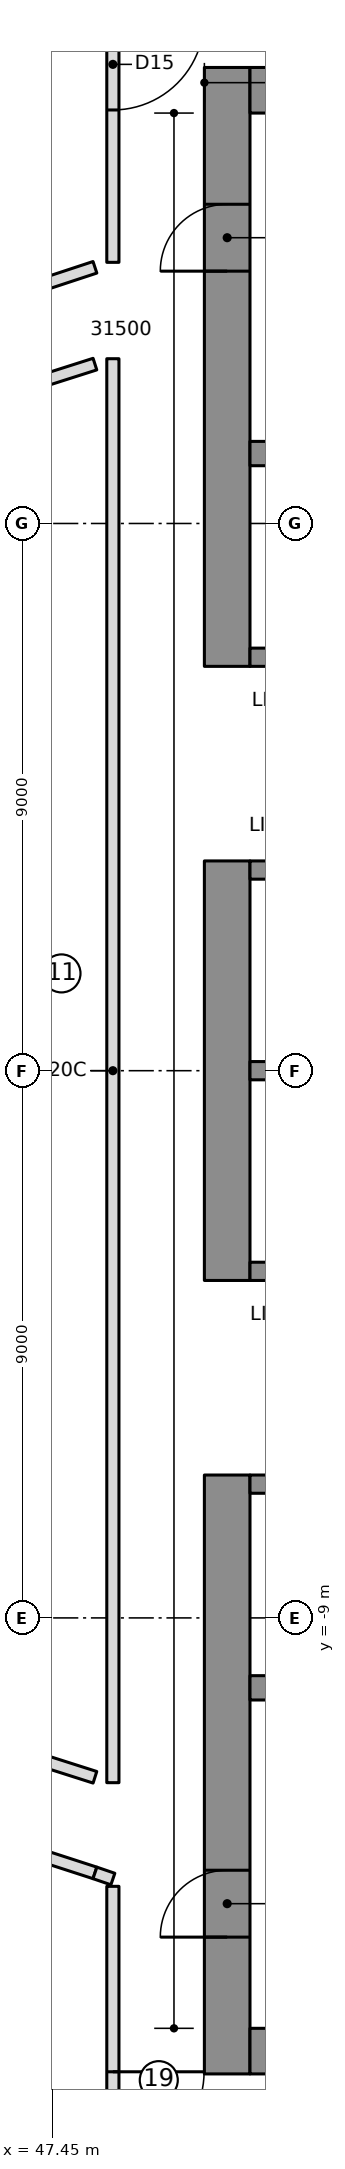
"""IFC4 building model, lengths in metres.
Left out: names, types, materials, properties, quantities, classifications, styles, units other than length and angle.
Written with IfcOpenShell. Run it as: python <this file> out.ifc"""

import sys

from ifc_helpers import new_model, si_unit, direction, frame, frame_2d, origin, place, context, subcontext, project, spatial, rectangle, extrude, element, fill, save


model = new_model("IFC4")
c1 = context("Model", 3, precision=1e-05, world=origin(), true_north=direction((0.0, 1.0)))
c2 = subcontext(c1, "Body", "Model", "MODEL_VIEW")
j1 = project(units=[si_unit("LENGTHUNIT", "METRE"), si_unit("PLANEANGLEUNIT", "RADIAN")], contexts=[c1])
p1 = place(None, origin())
s1 = spatial("IfcSite", under=j1, at=p1, CompositionType="ELEMENT")
p2 = place(p1, origin())
s2 = spatial("IfcBuilding", under=s1, at=p2, CompositionType="ELEMENT")
p3 = place(p2, frame((0.0, 0.0, 189.7)))
s3 = spatial("IfcBuildingStorey", under=s2, at=p3, CompositionType="ELEMENT", Elevation=189.7)
p4 = place(p3, frame((50.325, 6.65, 0.0), z_axis=(0.0, 0.0, 1.0), x_axis=(0.0, 1.0, 0.0)))
e1 = element("IfcWall", 1, at=p4, inside=s3, PredefinedType="SHEAR", context=c2, shape_type="SweptSolid", body=[
    extrude(rectangle(XDim=9.85, YDim=0.75, at=frame_2d((4.925, 0.0))), origin(), (0.0, 0.0, 1.0), 3.55),
])
p5 = place(p4, frame((6.5, 0.0, 0.0)))
e2 = element("IfcOpeningElement", 2, at=p5, cuts=e1, PredefinedType="OPENING", context=c2, shape_type="SweptSolid", body=[
    extrude(rectangle(XDim=1.1, YDim=2.1, at=frame_2d((0.55, 1.05))), frame((0.0, 0.385, 0.0), z_axis=(0.0, -1.0, 0.0), x_axis=(1.0, 0.0, 0.0)), (0.0, 0.0, 1.0), 0.77),
])
p6 = place(p3, frame((50.325, -3.45, 0.0), z_axis=(0.0, 0.0, 1.0), x_axis=(0.0, 1.0, 0.0)))
e3 = element("IfcWall", 3, at=p6, inside=s3, PredefinedType="SHEAR", context=c2, shape_type="SweptSolid", body=[
    extrude(rectangle(XDim=6.9, YDim=0.75, at=frame_2d((3.45, 0.0))), origin(), (0.0, 0.0, 1.0), 3.55),
])
p7 = place(p3, frame((50.325, -16.5, 0.0), z_axis=(0.0, 0.0, 1.0), x_axis=(0.0, 1.0, 0.0)))
e4 = element("IfcWall", 4, at=p7, inside=s3, PredefinedType="SHEAR", context=c2, shape_type="SweptSolid", body=[
    extrude(rectangle(XDim=9.85, YDim=0.75, at=frame_2d((4.925, 0.0))), origin(), (0.0, 0.0, 1.0), 3.55),
])
p8 = place(p7, frame((2.25, 0.0, 0.0)))
e5 = element("IfcOpeningElement", 5, at=p8, cuts=e4, PredefinedType="OPENING", context=c2, shape_type="SweptSolid", body=[
    extrude(rectangle(XDim=1.1, YDim=2.1, at=frame_2d((0.55, 1.05))), frame((0.0, 0.385, 0.0), z_axis=(0.0, -1.0, 0.0), x_axis=(1.0, 0.0, 0.0)), (0.0, 0.0, 1.0), 0.77),
])
for number, where, z_axis, x_axis in (
    (6, (50.7, 16.125, 0.0), (0.0, 0.0, 1.0), (1.0, 0.0, 0.0)),
    (7, (50.7, -16.125, 0.0), (0.0, 0.0, 1.0), (1.0, 0.0, 0.0)),
):
    element("IfcWall", number, at=place(p3, frame(where, z_axis=z_axis, x_axis=x_axis)), inside=s3, PredefinedType="SHEAR", context=c2, shape_type="SweptSolid", body=[
        extrude(rectangle(XDim=13.77, YDim=0.75, at=frame_2d((6.885, 0.0))), origin(), (0.0, 0.0, 1.0), 3.55),
    ])
p9 = place(p3, frame((50.7, 10.15, 0.0), z_axis=(0.0, 0.0, 1.0), x_axis=(1.0, 0.0, 0.0)))
e8 = element("IfcWall", 8, at=p9, inside=s3, PredefinedType="SHEAR", context=c2, shape_type="SweptSolid", body=[
    extrude(rectangle(XDim=13.02, YDim=0.4, at=frame_2d((6.51, 0.0))), origin(), (0.0, 0.0, 1.0), 3.55),
])
p10 = place(p9, frame((0.7, 0.0, 0.0)))
e9 = element("IfcOpeningElement", 9, at=p10, cuts=e8, PredefinedType="OPENING", context=c2, shape_type="SweptSolid", body=[
    extrude(rectangle(XDim=1.1, YDim=2.1, at=frame_2d((0.55, 1.05))), frame((0.0, 0.21, 0.0), z_axis=(0.0, -1.0, 0.0), x_axis=(1.0, 0.0, 0.0)), (0.0, 0.0, 1.0), 0.42),
])
p11 = place(p9, frame((3.5, 0.0, 0.0)))
e10 = element("IfcOpeningElement", 10, at=p11, cuts=e8, PredefinedType="OPENING", context=c2, shape_type="SweptSolid", body=[
    extrude(rectangle(XDim=1.1, YDim=2.1, at=frame_2d((0.55, 1.05))), frame((0.0, 0.21, 0.0), z_axis=(0.0, -1.0, 0.0), x_axis=(1.0, 0.0, 0.0)), (0.0, 0.0, 1.0), 0.42),
])
p12 = place(p3, frame((50.7, -10.15, 0.0), z_axis=(0.0, 0.0, 1.0), x_axis=(1.0, 0.0, 0.0)))
e11 = element("IfcWall", 11, at=p12, inside=s3, PredefinedType="SHEAR", context=c2, shape_type="SweptSolid", body=[
    extrude(rectangle(XDim=13.02, YDim=0.4, at=frame_2d((6.51, 0.0))), origin(), (0.0, 0.0, 1.0), 3.55),
])
p13 = place(p3, frame((50.7, 0.0, 0.0), z_axis=(0.0, 0.0, 1.0), x_axis=(1.0, 0.0, 0.0)))
e12 = element("IfcWall", 12, at=p13, inside=s3, PredefinedType="SHEAR", context=c2, shape_type="SweptSolid", body=[
    extrude(rectangle(XDim=10.9, YDim=0.3, at=frame_2d((5.45, 0.0))), origin(), (0.0, 0.0, 1.0), 3.55),
])
p14 = place(p3, frame((50.7, 3.3, 0.0), z_axis=(0.0, 0.0, 1.0), x_axis=(1.0, 0.0, 0.0)))
e13 = element("IfcWall", 13, at=p14, inside=s3, PredefinedType="SHEAR", context=c2, shape_type="SweptSolid", body=[
    extrude(rectangle(XDim=10.9, YDim=0.3, at=frame_2d((5.45, 0.0))), origin(), (0.0, 0.0, 1.0), 3.55),
])
p15 = place(p14, frame((0.7, 0.0, 0.0)))
e14 = element("IfcOpeningElement", 14, at=p15, cuts=e13, PredefinedType="OPENING", context=c2, shape_type="SweptSolid", body=[
    extrude(rectangle(XDim=1.1, YDim=2.1, at=frame_2d((0.55, 1.05))), frame((0.0, 0.16, 0.0), z_axis=(0.0, -1.0, 0.0), x_axis=(1.0, 0.0, 0.0)), (0.0, 0.0, 1.0), 0.32),
])
p16 = place(p14, frame((3.5, 0.0, 0.0)))
e15 = element("IfcOpeningElement", 15, at=p16, cuts=e13, PredefinedType="OPENING", context=c2, shape_type="SweptSolid", body=[
    extrude(rectangle(XDim=1.1, YDim=2.1, at=frame_2d((0.55, 1.05))), frame((0.0, 0.16, 0.0), z_axis=(0.0, -1.0, 0.0), x_axis=(1.0, 0.0, 0.0)), (0.0, 0.0, 1.0), 0.32),
])
p17 = place(p14, frame((6.3, 0.0, 0.0)))
e16 = element("IfcOpeningElement", 16, at=p17, cuts=e13, PredefinedType="OPENING", context=c2, shape_type="SweptSolid", body=[
    extrude(rectangle(XDim=1.1, YDim=2.1, at=frame_2d((0.55, 1.05))), frame((0.0, 0.16, 0.0), z_axis=(0.0, -1.0, 0.0), x_axis=(1.0, 0.0, 0.0)), (0.0, 0.0, 1.0), 0.32),
])
p18 = place(p14, frame((9.1, 0.0, 0.0)))
e17 = element("IfcOpeningElement", 17, at=p18, cuts=e13, PredefinedType="OPENING", context=c2, shape_type="SweptSolid", body=[
    extrude(rectangle(XDim=1.1, YDim=2.1, at=frame_2d((0.55, 1.05))), frame((0.0, 0.16, 0.0), z_axis=(0.0, -1.0, 0.0), x_axis=(1.0, 0.0, 0.0)), (0.0, 0.0, 1.0), 0.32),
])
p19 = place(p3, frame((50.7, 6.8, 0.0), z_axis=(0.0, 0.0, 1.0), x_axis=(1.0, 0.0, 0.0)))
e18 = element("IfcWall", 18, at=p19, inside=s3, PredefinedType="SHEAR", context=c2, shape_type="SweptSolid", body=[
    extrude(rectangle(XDim=10.9, YDim=0.3, at=frame_2d((5.45, 0.0))), origin(), (0.0, 0.0, 1.0), 3.55),
])
p20 = place(p19, frame((6.4, 0.0, 0.0)))
e19 = element("IfcOpeningElement", 19, at=p20, cuts=e18, PredefinedType="OPENING", context=c2, shape_type="SweptSolid", body=[
    extrude(rectangle(XDim=0.9, YDim=2.1, at=frame_2d((0.45, 1.05))), frame((0.0, 0.16, 0.0), z_axis=(0.0, -1.0, 0.0), x_axis=(1.0, 0.0, 0.0)), (0.0, 0.0, 1.0), 0.32),
])
p21 = place(p19, frame((9.2, 0.0, 0.0)))
e20 = element("IfcOpeningElement", 20, at=p21, cuts=e18, PredefinedType="OPENING", context=c2, shape_type="SweptSolid", body=[
    extrude(rectangle(XDim=0.9, YDim=2.1, at=frame_2d((0.45, 1.05))), frame((0.0, 0.16, 0.0), z_axis=(0.0, -1.0, 0.0), x_axis=(1.0, 0.0, 0.0)), (0.0, 0.0, 1.0), 0.32),
])
p22 = place(p3, frame((50.7, -3.3, 0.0), z_axis=(0.0, 0.0, 1.0), x_axis=(1.0, 0.0, 0.0)))
e21 = element("IfcWall", 21, at=p22, inside=s3, PredefinedType="SHEAR", context=c2, shape_type="SweptSolid", body=[
    extrude(rectangle(XDim=10.9, YDim=0.3, at=frame_2d((5.45, 0.0))), origin(), (0.0, 0.0, 1.0), 3.55),
])
p23 = place(p22, frame((9.1, 0.0, 0.0)))
e22 = element("IfcOpeningElement", 22, at=p23, cuts=e21, PredefinedType="OPENING", context=c2, shape_type="SweptSolid", body=[
    extrude(rectangle(XDim=1.1, YDim=2.1, at=frame_2d((0.55, 1.05))), frame((0.0, 0.16, 0.0), z_axis=(0.0, -1.0, 0.0), x_axis=(1.0, 0.0, 0.0)), (0.0, 0.0, 1.0), 0.32),
])
p24 = place(p3, frame((50.7, -6.8, 0.0), z_axis=(0.0, 0.0, 1.0), x_axis=(1.0, 0.0, 0.0)))
e23 = element("IfcWall", 23, at=p24, inside=s3, PredefinedType="SHEAR", context=c2, shape_type="SweptSolid", body=[
    extrude(rectangle(XDim=10.9, YDim=0.3, at=frame_2d((5.45, 0.0))), origin(), (0.0, 0.0, 1.0), 3.55),
])
p25 = place(p24, frame((6.3, 0.0, 0.0)))
e24 = element("IfcOpeningElement", 24, at=p25, cuts=e23, PredefinedType="OPENING", context=c2, shape_type="SweptSolid", body=[
    extrude(rectangle(XDim=1.1, YDim=2.1, at=frame_2d((0.55, 1.05))), frame((0.0, 0.16, 0.0), z_axis=(0.0, -1.0, 0.0), x_axis=(1.0, 0.0, 0.0)), (0.0, 0.0, 1.0), 0.32),
])
p26 = place(p24, frame((9.1, 0.0, 0.0)))
e25 = element("IfcOpeningElement", 25, at=p26, cuts=e23, PredefinedType="OPENING", context=c2, shape_type="SweptSolid", body=[
    extrude(rectangle(XDim=1.1, YDim=2.1, at=frame_2d((0.55, 1.05))), frame((0.0, 0.16, 0.0), z_axis=(0.0, -1.0, 0.0), x_axis=(1.0, 0.0, 0.0)), (0.0, 0.0, 1.0), 0.32),
])
p27 = place(p24, frame((0.8, 0.0, 0.0)))
e26 = element("IfcOpeningElement", 26, at=p27, cuts=e23, PredefinedType="OPENING", context=c2, shape_type="SweptSolid", body=[
    extrude(rectangle(XDim=0.9, YDim=2.1, at=frame_2d((0.45, 1.05))), frame((0.0, 0.16, 0.0), z_axis=(0.0, -1.0, 0.0), x_axis=(1.0, 0.0, 0.0)), (0.0, 0.0, 1.0), 0.32),
])
p28 = place(p24, frame((3.6, 0.0, 0.0)))
e27 = element("IfcOpeningElement", 27, at=p28, cuts=e23, PredefinedType="OPENING", context=c2, shape_type="SweptSolid", body=[
    extrude(rectangle(XDim=0.9, YDim=2.1, at=frame_2d((0.45, 1.05))), frame((0.0, 0.16, 0.0), z_axis=(0.0, -1.0, 0.0), x_axis=(1.0, 0.0, 0.0)), (0.0, 0.0, 1.0), 0.32),
])
p29 = place(p3, frame((48.15, 13.213, 0.0), z_axis=(0.0, 0.0, 1.0), x_axis=(-0.949729856115, -0.313070599711, 0.0)))
e28 = element("IfcWall", 28, at=p29, inside=s3, PredefinedType="PARTITIONING", context=c2, shape_type="SweptSolid", body=[
    extrude(rectangle(XDim=3.853, YDim=0.2, at=frame_2d((1.927, 0.0))), origin(), (0.0, 0.0, 1.0), 3.25),
])
p30 = place(p3, frame((44.49, -12.007, 0.0), z_axis=(0.0, 0.0, 1.0), x_axis=(0.951228355446, -0.308487626648, 0.0)))
e29 = element("IfcWall", 29, at=p30, inside=s3, PredefinedType="PARTITIONING", context=c2, shape_type="SweptSolid", body=[
    extrude(rectangle(XDim=3.847, YDim=0.2, at=frame_2d((1.924, 0.0))), origin(), (0.0, 0.0, 1.0), 3.25),
])
for number, where, z_axis, x_axis in (
    (30, (46.881, 11.217, 0.0), (0.0, 0.0, 1.0), (0.953, 0.304, 0.0)),
    (31, (48.15, -11.621, 0.0), (0.0, 0.0, 1.0), (-0.953, 0.304, 0.0)),
):
    element("IfcWall", number, at=place(p3, frame(where, z_axis=z_axis, x_axis=x_axis)), inside=s3, PredefinedType="PARTITIONING", context=c2, shape_type="SweptSolid", body=[
        extrude(rectangle(XDim=1.332, YDim=0.2, at=frame_2d((0.666, 0.0))), origin(), (0.0, 0.0, 1.0), 3.25),
    ])
p31 = place(p3, frame((48.445, 11.71, 0.0), z_axis=(0.0, 0.0, 1.0), x_axis=(0.0, -1.0, 0.0)))
e32 = element("IfcWall", 32, at=p31, inside=s3, PredefinedType="PARTITIONING", context=c2, shape_type="SweptSolid", body=[
    extrude(rectangle(XDim=23.42, YDim=0.2, at=frame_2d((11.71, 0.0))), origin(), (0.0, 0.0, 1.0), 3.25),
])
p32 = place(p3, frame((48.445, 20.351, 0.0), z_axis=(0.0, 0.0, 1.0), x_axis=(0.0, -1.0, 0.0)))
e33 = element("IfcWall", 33, at=p32, inside=s3, PredefinedType="PARTITIONING", context=c2, shape_type="SweptSolid", body=[
    extrude(rectangle(XDim=7.056, YDim=0.2, at=frame_2d((3.528, 0.0))), origin(), (0.0, 0.0, 1.0), 3.25),
])
p33 = place(p32, frame((3.05, 0.0, 0.0)))
e34 = element("IfcOpeningElement", 34, at=p33, cuts=e33, PredefinedType="OPENING", context=c2, shape_type="SweptSolid", body=[
    extrude(rectangle(XDim=1.5, YDim=2.1, at=frame_2d((0.75, 1.05))), frame((0.0, 0.11, 0.0), z_axis=(0.0, -1.0, 0.0), x_axis=(1.0, 0.0, 0.0)), (0.0, 0.0, 1.0), 0.22),
])
p34 = place(p3, frame((48.15, -13.194, 0.0), z_axis=(0.0, 0.0, 1.0), x_axis=(0.946069343286, -0.323964191994, 0.0)))
e35 = element("IfcWall", 35, at=p34, inside=s3, PredefinedType="PARTITIONING", context=c2, shape_type="SweptSolid", body=[
    extrude(rectangle(XDim=0.312, YDim=0.2, at=frame_2d((0.156, 0.0))), origin(), (0.0, 0.0, 1.0), 3.25),
])
p35 = place(p3, frame((48.445, -13.415, 0.0), z_axis=(0.0, 0.0, 1.0), x_axis=(0.0, -1.0, 0.0)))
e36 = element("IfcWall", 36, at=p35, inside=s3, PredefinedType="PARTITIONING", context=c2, shape_type="SweptSolid", body=[
    extrude(rectangle(XDim=6.936, YDim=0.2, at=frame_2d((3.468, 0.0))), origin(), (0.0, 0.0, 1.0), 3.25),
])
p36 = place(p35, frame((3.05, 0.0, 0.0)))
e37 = element("IfcOpeningElement", 37, at=p36, cuts=e36, PredefinedType="OPENING", context=c2, shape_type="SweptSolid", body=[
    extrude(rectangle(XDim=1.5, YDim=2.1, at=frame_2d((0.75, 1.05))), frame((0.0, 0.11, 0.0), z_axis=(0.0, -1.0, 0.0), x_axis=(1.0, 0.0, 0.0)), (0.0, 0.0, 1.0), 0.22),
])
p37 = place(p33, origin())
e38 = element("IfcDoor", 38, at=p37, inside=s3, OperationType="DOUBLE_DOOR_SINGLE_SWING", PredefinedType="DOOR", context=c2, shape_type="SweptSolid", body=[
    extrude(rectangle(XDim=1.5, YDim=2.1, at=frame_2d((0.75, 1.05))), frame((0.0, 0.025, 0.0), z_axis=(0.0, -1.0, 0.0), x_axis=(1.0, 0.0, 0.0)), (0.0, 0.0, 1.0), 0.05),
])
fill(e34, e38)
p38 = place(p36, origin())
e39 = element("IfcDoor", 39, at=p38, inside=s3, OperationType="DOUBLE_DOOR_SINGLE_SWING", PredefinedType="DOOR", context=c2, shape_type="SweptSolid", body=[
    extrude(rectangle(XDim=1.5, YDim=2.1, at=frame_2d((0.75, 1.05))), frame((0.0, 0.025, 0.0), z_axis=(0.0, -1.0, 0.0), x_axis=(1.0, 0.0, 0.0)), (0.0, 0.0, 1.0), 0.05),
])
fill(e37, e39)
p39 = place(p5, origin())
e40 = element("IfcDoor", 40, at=p39, inside=s3, OperationType="SINGLE_SWING_RIGHT", PredefinedType="DOOR", context=c2, shape_type="SweptSolid", body=[
    extrude(rectangle(XDim=1.1, YDim=2.1, at=frame_2d((0.55, 1.05))), frame((0.0, 0.025, 0.0), z_axis=(0.0, -1.0, 0.0), x_axis=(1.0, 0.0, 0.0)), (0.0, 0.0, 1.0), 0.05),
])
fill(e2, e40)
p40 = place(p8, origin())
e41 = element("IfcDoor", 41, at=p40, inside=s3, OperationType="SINGLE_SWING_RIGHT", PredefinedType="DOOR", context=c2, shape_type="SweptSolid", body=[
    extrude(rectangle(XDim=1.1, YDim=2.1, at=frame_2d((0.55, 1.05))), frame((0.0, 0.025, 0.0), z_axis=(0.0, -1.0, 0.0), x_axis=(1.0, 0.0, 0.0)), (0.0, 0.0, 1.0), 0.05),
])
fill(e5, e41)
save(model, sys.argv[1])
